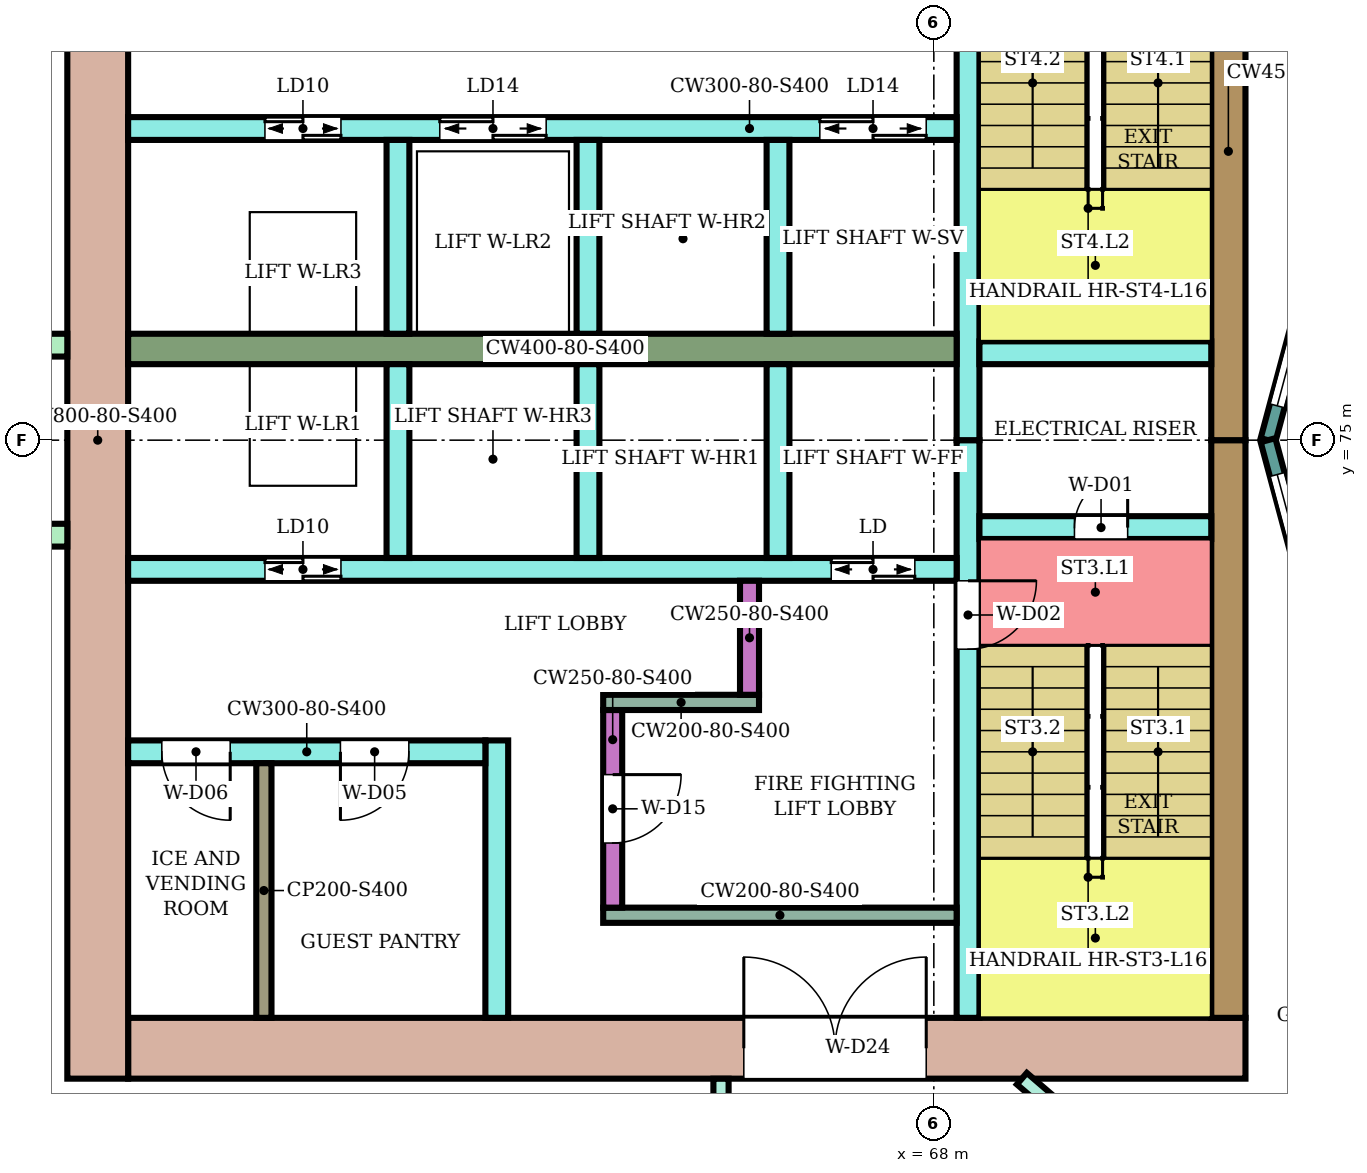
"""IFC4 building model, lengths in metres.
Left out: names, types, materials, properties, quantities, classifications, styles, units other than length and angle.
Written with IfcOpenShell. Run it as: python <this file> out.ifc"""

import sys

from ifc_helpers import new_model, si_unit, direction, frame, frame_2d, origin, place, context, subcontext, project, spatial, rectangle, extrude, element, fill, save


model = new_model("IFC4")
c1 = context("Model", 3, precision=1e-05, world=origin(), true_north=direction((0.0, 1.0)))
c2 = subcontext(c1, "Body", "Model", "MODEL_VIEW")
j1 = project(units=[si_unit("LENGTHUNIT", "METRE"), si_unit("PLANEANGLEUNIT", "RADIAN")], contexts=[c1])
p1 = place(None, origin())
s1 = spatial("IfcSite", under=j1, at=p1, CompositionType="ELEMENT")
p2 = place(p1, origin())
s2 = spatial("IfcBuilding", under=s1, at=p2, CompositionType="ELEMENT")
p3 = place(p2, frame((0.0, 0.0, 70.6)))
s3 = spatial("IfcBuildingStorey", under=s2, at=p3, CompositionType="ELEMENT", Elevation=70.6)
p4 = place(p3, frame((72.1, 67.0, 0.0), z_axis=(0.0, 0.0, 1.0), x_axis=(-1.0, 0.0, 0.0)))
e1 = element("IfcWall", 1, at=p4, inside=s3, PredefinedType="SHEAR", context=c2, shape_type="SweptSolid", body=[
    extrude(rectangle(XDim=14.7, YDim=0.8, at=frame_2d((7.35, 0.0))), origin(), (0.0, 0.0, 1.0), 3.4),
])
p5 = place(p4, frame((4.2, 0.0, 0.0)))
e2 = element("IfcOpeningElement", 2, at=p5, cuts=e1, PredefinedType="OPENING", context=c2, shape_type="SweptSolid", body=[
    extrude(rectangle(XDim=2.4, YDim=2.4, at=frame_2d((1.2, 1.2))), frame((0.0, 0.41, 0.0), z_axis=(0.0, -1.0, 0.0), x_axis=(1.0, 0.0, 0.0)), (0.0, 0.0, 1.0), 0.82),
])
for number, where, z_axis, x_axis in (
    (3, (71.875, 75.0, 0.0), (0.0, 0.0, 1.0), (0.0, -1.0, 0.0)),
    (4, (71.875, 82.6, 0.0), (0.0, 0.0, 1.0), (0.0, -1.0, 0.0)),
):
    element("IfcWall", number, at=place(p3, frame(where, z_axis=z_axis, x_axis=x_axis)), inside=s3, PredefinedType="SHEAR", context=c2, shape_type="SweptSolid", body=[
        extrude(rectangle(XDim=7.6, YDim=0.45, at=frame_2d((3.8, 0.0))), origin(), (0.0, 0.0, 1.0), 3.4),
    ])
p6 = place(p3, frame((57.0, 83.4, 0.0), z_axis=(0.0, 0.0, 1.0), x_axis=(0.0, -1.0, 0.0)))
e5 = element("IfcWall", 5, at=p6, inside=s3, PredefinedType="SHEAR", context=c2, shape_type="SweptSolid", body=[
    extrude(rectangle(XDim=16.8, YDim=0.8, at=frame_2d((8.4, 0.0))), origin(), (0.0, 0.0, 1.0), 3.4),
])
p7 = place(p3, frame((68.45, 75.0, 0.0), z_axis=(0.0, 0.0, 1.0), x_axis=(0.0, -1.0, 0.0)))
e6 = element("IfcWall", 6, at=p7, inside=s3, PredefinedType="SHEAR", context=c2, shape_type="SweptSolid", body=[
    extrude(rectangle(XDim=7.6, YDim=0.3, at=frame_2d((3.8, 0.0))), origin(), (0.0, 0.0, 1.0), 3.4),
])
p8 = place(p7, frame((1.85, 0.0, 0.0)))
e7 = element("IfcOpeningElement", 7, at=p8, cuts=e6, PredefinedType="OPENING", context=c2, shape_type="SweptSolid", body=[
    extrude(rectangle(XDim=0.9, YDim=2.1, at=frame_2d((0.45, 1.05))), frame((0.0, 0.16, 0.0), z_axis=(0.0, -1.0, 0.0), x_axis=(1.0, 0.0, 0.0)), (0.0, 0.0, 1.0), 0.32),
])
p9 = place(p3, frame((68.45, 82.6, 0.0), z_axis=(0.0, 0.0, 1.0), x_axis=(0.0, -1.0, 0.0)))
e8 = element("IfcWall", 8, at=p9, inside=s3, PredefinedType="SHEAR", context=c2, shape_type="SweptSolid", body=[
    extrude(rectangle(XDim=7.6, YDim=0.3, at=frame_2d((3.8, 0.0))), origin(), (0.0, 0.0, 1.0), 3.4),
])
p10 = place(p9, frame((0.25, 0.0, 0.0)))
e9 = element("IfcOpeningElement", 9, at=p10, cuts=e8, PredefinedType="OPENING", context=c2, shape_type="SweptSolid", body=[
    extrude(rectangle(XDim=0.9, YDim=2.1, at=frame_2d((0.45, 1.05))), frame((0.0, 0.16, 0.0), z_axis=(0.0, -1.0, 0.0), x_axis=(1.0, 0.0, 0.0)), (0.0, 0.0, 1.0), 0.32),
])
p11 = place(p3, frame((71.65, 73.85, 0.0), z_axis=(0.0, 0.0, 1.0), x_axis=(-1.0, 0.0, 0.0)))
e10 = element("IfcWall", 10, at=p11, inside=s3, PredefinedType="SHEAR", context=c2, shape_type="SweptSolid", body=[
    extrude(rectangle(XDim=3.05, YDim=0.3, at=frame_2d((1.525, 0.0))), origin(), (0.0, 0.0, 1.0), 3.4),
])
p12 = place(p11, frame((1.1, 0.0, 0.0)))
e11 = element("IfcOpeningElement", 11, at=p12, cuts=e10, PredefinedType="OPENING", context=c2, shape_type="SweptSolid", body=[
    extrude(rectangle(XDim=0.7, YDim=2.0, at=frame_2d((0.35, 1.0))), frame((0.0, 0.16, 0.0), z_axis=(0.0, -1.0, 0.0), x_axis=(1.0, 0.0, 0.0)), (0.0, 0.0, 1.0), 0.32),
])
p13 = place(p3, frame((71.65, 76.15, 0.0), z_axis=(0.0, 0.0, 1.0), x_axis=(-1.0, 0.0, 0.0)))
e12 = element("IfcWall", 12, at=p13, inside=s3, PredefinedType="SHEAR", context=c2, shape_type="SweptSolid", body=[
    extrude(rectangle(XDim=3.05, YDim=0.3, at=frame_2d((1.525, 0.0))), origin(), (0.0, 0.0, 1.0), 3.4),
])
p14 = place(p3, frame((68.3, 73.3, 0.0), z_axis=(0.0, 0.0, 1.0), x_axis=(-1.0, 0.0, 0.0)))
e13 = element("IfcWall", 13, at=p14, inside=s3, PredefinedType="SHEAR", context=c2, shape_type="SweptSolid", body=[
    extrude(rectangle(XDim=10.9, YDim=0.3, at=frame_2d((5.45, 0.0))), origin(), (0.0, 0.0, 1.0), 3.4),
])
p15 = place(p14, frame((0.55, 0.0, 0.0)))
e14 = element("IfcOpeningElement", 14, at=p15, cuts=e13, PredefinedType="OPENING", context=c2, shape_type="SweptSolid", body=[
    extrude(rectangle(XDim=1.1, YDim=2.1, at=frame_2d((0.55, 1.05))), frame((0.0, 0.16, 0.0), z_axis=(0.0, -1.0, 0.0), x_axis=(1.0, 0.0, 0.0)), (0.0, 0.0, 1.0), 0.32),
])
p16 = place(p14, frame((8.1, 0.0, 0.0)))
e15 = element("IfcOpeningElement", 15, at=p16, cuts=e13, PredefinedType="OPENING", context=c2, shape_type="SweptSolid", body=[
    extrude(rectangle(XDim=1.0, YDim=2.1, at=frame_2d((0.5, 1.05))), frame((0.0, 0.16, 0.0), z_axis=(0.0, -1.0, 0.0), x_axis=(1.0, 0.0, 0.0)), (0.0, 0.0, 1.0), 0.32),
])
p17 = place(p3, frame((68.3, 76.2, 0.0), z_axis=(0.0, 0.0, 1.0), x_axis=(-1.0, 0.0, 0.0)))
e16 = element("IfcWall", 16, at=p17, inside=s3, PredefinedType="SHEAR", context=c2, shape_type="SweptSolid", body=[
    extrude(rectangle(XDim=10.9, YDim=0.4, at=frame_2d((5.45, 0.0))), origin(), (0.0, 0.0, 1.0), 3.4),
])
p18 = place(p3, frame((68.3, 79.1, 0.0), z_axis=(0.0, 0.0, 1.0), x_axis=(-1.0, 0.0, 0.0)))
e17 = element("IfcWall", 17, at=p18, inside=s3, PredefinedType="SHEAR", context=c2, shape_type="SweptSolid", body=[
    extrude(rectangle(XDim=10.9, YDim=0.3, at=frame_2d((5.45, 0.0))), origin(), (0.0, 0.0, 1.0), 3.4),
])
p19 = place(p18, frame((0.4, 0.0, 0.0)))
e18 = element("IfcOpeningElement", 18, at=p19, cuts=e17, PredefinedType="OPENING", context=c2, shape_type="SweptSolid", body=[
    extrude(rectangle(XDim=1.4, YDim=2.1, at=frame_2d((0.7, 1.05))), frame((0.0, 0.16, 0.0), z_axis=(0.0, -1.0, 0.0), x_axis=(1.0, 0.0, 0.0)), (0.0, 0.0, 1.0), 0.32),
])
p20 = place(p18, frame((5.4, 0.0, 0.0)))
e19 = element("IfcOpeningElement", 19, at=p20, cuts=e17, PredefinedType="OPENING", context=c2, shape_type="SweptSolid", body=[
    extrude(rectangle(XDim=1.4, YDim=2.1, at=frame_2d((0.7, 1.05))), frame((0.0, 0.16, 0.0), z_axis=(0.0, -1.0, 0.0), x_axis=(1.0, 0.0, 0.0)), (0.0, 0.0, 1.0), 0.32),
])
p21 = place(p18, frame((8.1, 0.0, 0.0)))
e20 = element("IfcOpeningElement", 20, at=p21, cuts=e17, PredefinedType="OPENING", context=c2, shape_type="SweptSolid", body=[
    extrude(rectangle(XDim=1.0, YDim=2.1, at=frame_2d((0.5, 1.05))), frame((0.0, 0.16, 0.0), z_axis=(0.0, -1.0, 0.0), x_axis=(1.0, 0.0, 0.0)), (0.0, 0.0, 1.0), 0.32),
])
for number, where, z_axis, x_axis in (
    (21, (65.95, 76.0, 0.0), (0.0, 0.0, 1.0), (0.0, -1.0, 0.0)),
    (22, (63.45, 76.0, 0.0), (0.0, 0.0, 1.0), (0.0, -1.0, 0.0)),
    (23, (60.95, 76.0, 0.0), (0.0, 0.0, 1.0), (0.0, -1.0, 0.0)),
    (24, (65.95, 78.95, 0.0), (0.0, 0.0, 1.0), (0.0, -1.0, 0.0)),
    (25, (63.45, 78.95, 0.0), (0.0, 0.0, 1.0), (0.0, -1.0, 0.0)),
    (26, (60.95, 78.95, 0.0), (0.0, 0.0, 1.0), (0.0, -1.0, 0.0)),
):
    element("IfcWall", number, at=place(p3, frame(where, z_axis=z_axis, x_axis=x_axis)), inside=s3, PredefinedType="SHEAR", context=c2, shape_type="SweptSolid", body=[
        extrude(rectangle(XDim=2.55, YDim=0.3, at=frame_2d((1.275, 0.0))), origin(), (0.0, 0.0, 1.0), 3.4),
    ])
p22 = place(p3, frame((68.3, 68.75, 0.0), z_axis=(0.0, 0.0, 1.0), x_axis=(-1.0, 0.0, 0.0)))
e27 = element("IfcWall", 27, at=p22, inside=s3, PredefinedType="SHEAR", context=c2, shape_type="SweptSolid", body=[
    extrude(rectangle(XDim=4.65, YDim=0.2, at=frame_2d((2.325, 0.0))), origin(), (0.0, 0.0, 1.0), 3.4),
])
p23 = place(p3, frame((63.775, 71.45, 0.0), z_axis=(0.0, 0.0, 1.0), x_axis=(0.0, -1.0, 0.0)))
e28 = element("IfcWall", 28, at=p23, inside=s3, PredefinedType="SHEAR", context=c2, shape_type="SweptSolid", body=[
    extrude(rectangle(XDim=2.6, YDim=0.25, at=frame_2d((1.3, 0.0))), origin(), (0.0, 0.0, 1.0), 3.4),
])
p24 = place(p23, frame((0.85, 0.0, 0.0)))
e29 = element("IfcOpeningElement", 29, at=p24, cuts=e28, PredefinedType="OPENING", context=c2, shape_type="SweptSolid", body=[
    extrude(rectangle(XDim=0.9, YDim=2.1, at=frame_2d((0.45, 1.05))), frame((0.0, 0.135, 0.0), z_axis=(0.0, -1.0, 0.0), x_axis=(1.0, 0.0, 0.0)), (0.0, 0.0, 1.0), 0.27),
])
p25 = place(p3, frame((65.7, 71.55, 0.0), z_axis=(0.0, 0.0, 1.0), x_axis=(-1.0, 0.0, 0.0)))
e30 = element("IfcWall", 30, at=p25, inside=s3, PredefinedType="SHEAR", context=c2, shape_type="SweptSolid", body=[
    extrude(rectangle(XDim=2.05, YDim=0.2, at=frame_2d((1.025, 0.0))), origin(), (0.0, 0.0, 1.0), 3.4),
])
p26 = place(p3, frame((65.575, 73.15, 0.0), z_axis=(0.0, 0.0, 1.0), x_axis=(0.0, -1.0, 0.0)))
e31 = element("IfcWall", 31, at=p26, inside=s3, PredefinedType="SHEAR", context=c2, shape_type="SweptSolid", body=[
    extrude(rectangle(XDim=1.5, YDim=0.25, at=frame_2d((0.75, 0.0))), origin(), (0.0, 0.0, 1.0), 3.4),
])
p27 = place(p3, frame((62.25, 71.05, 0.0), z_axis=(0.0, 0.0, 1.0), x_axis=(0.0, -1.0, 0.0)))
e32 = element("IfcWall", 32, at=p27, inside=s3, PredefinedType="SHEAR", context=c2, shape_type="SweptSolid", body=[
    extrude(rectangle(XDim=3.65, YDim=0.3, at=frame_2d((1.825, 0.0))), origin(), (0.0, 0.0, 1.0), 3.4),
])
p28 = place(p3, frame((62.1, 70.9, 0.0), z_axis=(0.0, 0.0, 1.0), x_axis=(-1.0, 0.0, 0.0)))
e33 = element("IfcWall", 33, at=p28, inside=s3, PredefinedType="SHEAR", context=c2, shape_type="SweptSolid", body=[
    extrude(rectangle(XDim=4.7, YDim=0.3, at=frame_2d((2.35, 0.0))), origin(), (0.0, 0.0, 1.0), 3.4),
])
p29 = place(p28, frame((1.007, 0.0, 0.0)))
e34 = element("IfcOpeningElement", 34, at=p29, cuts=e33, PredefinedType="OPENING", context=c2, shape_type="SweptSolid", body=[
    extrude(rectangle(XDim=0.9, YDim=2.1, at=frame_2d((0.45, 1.05))), frame((0.0, 0.16, 0.0), z_axis=(0.0, -1.0, 0.0), x_axis=(1.0, 0.0, 0.0)), (0.0, 0.0, 1.0), 0.32),
])
p30 = place(p28, frame((3.357, 0.0, 0.0)))
e35 = element("IfcOpeningElement", 35, at=p30, cuts=e33, PredefinedType="OPENING", context=c2, shape_type="SweptSolid", body=[
    extrude(rectangle(XDim=0.9, YDim=2.1, at=frame_2d((0.45, 1.05))), frame((0.0, 0.16, 0.0), z_axis=(0.0, -1.0, 0.0), x_axis=(1.0, 0.0, 0.0)), (0.0, 0.0, 1.0), 0.32),
])
for number, where, z_axis, x_axis in (
    (36, (56.6, 76.25, 0.0), (0.0, 0.0, 1.0), (-1.0, 0.0, 0.0)),
    (37, (56.6, 73.75, 0.0), (0.0, 0.0, 1.0), (-1.0, 0.0, 0.0)),
):
    element("IfcWall", number, at=place(p3, frame(where, z_axis=z_axis, x_axis=x_axis)), inside=s3, PredefinedType="NOTDEFINED", context=c2, shape_type="SweptSolid", body=[
        extrude(rectangle(XDim=2.416, YDim=0.3, at=frame_2d((1.208, 0.0))), origin(), (0.0, 0.0, 1.0), 3.8),
    ])
p31 = place(p3, frame((73.415, 78.802, 0.0), z_axis=(0.0, 0.0, 1.0), x_axis=(-0.258789828301, -0.965933654434, 0.0)))
e38 = element("IfcWall", 38, at=p31, inside=s3, PredefinedType="NOTDEFINED", context=c2, shape_type="SweptSolid", body=[
    extrude(rectangle(XDim=3.936, YDim=0.2, at=frame_2d((1.968, 0.0))), origin(), (0.0, 0.0, 1.0), 3.8),
])
p32 = place(p31, frame((0.468, 0.0, 0.9)))
e39 = element("IfcOpeningElement", 39, at=p32, cuts=e38, PredefinedType="OPENING", context=c2, shape_type="SweptSolid", body=[
    extrude(rectangle(XDim=3.0, YDim=2.3, at=frame_2d((1.5, 1.15))), frame((0.0, 0.11, 0.0), z_axis=(0.0, -1.0, 0.0), x_axis=(1.0, 0.0, 0.0)), (0.0, 0.0, 1.0), 0.22),
])
p33 = place(p3, frame((72.396, 75.0, 0.0), z_axis=(0.0, 0.0, 1.0), x_axis=(0.258789828301, -0.965933654434, 0.0)))
e40 = element("IfcWall", 40, at=p33, inside=s3, PredefinedType="NOTDEFINED", context=c2, shape_type="SweptSolid", body=[
    extrude(rectangle(XDim=3.936, YDim=0.2, at=frame_2d((1.968, 0.0))), origin(), (0.0, 0.0, 1.0), 3.8),
])
p34 = place(p33, frame((0.468, 0.0, 0.9)))
e41 = element("IfcOpeningElement", 41, at=p34, cuts=e40, PredefinedType="OPENING", context=c2, shape_type="SweptSolid", body=[
    extrude(rectangle(XDim=3.0, YDim=2.3, at=frame_2d((1.5, 1.15))), frame((0.0, 0.11, 0.0), z_axis=(0.0, -1.0, 0.0), x_axis=(1.0, 0.0, 0.0)), (0.0, 0.0, 1.0), 0.22),
])
p35 = place(p3, frame((65.2, 65.2, 0.0), z_axis=(0.0, 0.0, 1.0), x_axis=(0.0, 1.0, 0.0)))
e42 = element("IfcWall", 42, at=p35, inside=s3, PredefinedType="PARTITIONING", context=c2, shape_type="SweptSolid", body=[
    extrude(rectangle(XDim=1.399, YDim=0.2, at=frame_2d((0.7, 0.0))), origin(), (0.0, 0.0, 1.0), 3.35),
])
p36 = place(p3, frame((69.158, 66.6, 0.0), z_axis=(0.0, 0.0, 1.0), x_axis=(0.757976058094, -0.652282373943, 0.0)))
e43 = element("IfcWall", 43, at=p36, inside=s3, PredefinedType="PARTITIONING", context=c2, shape_type="SweptSolid", body=[
    extrude(rectangle(XDim=5.16, YDim=0.2, at=frame_2d((2.58, 0.0))), origin(), (0.0, 0.0, 1.0), 3.35),
])
p37 = place(p36, frame((1.6, 0.0, 0.0)))
e44 = element("IfcOpeningElement", 44, at=p37, cuts=e43, PredefinedType="OPENING", context=c2, shape_type="SweptSolid", body=[
    extrude(rectangle(XDim=1.0, YDim=2.1, at=frame_2d((0.5, 1.05))), frame((0.0, 0.11, 0.0), z_axis=(0.0, -1.0, 0.0), x_axis=(1.0, 0.0, 0.0)), (0.0, 0.0, 1.0), 0.22),
])
p38 = place(p3, frame((71.596, 64.635, 0.0), z_axis=(0.0, 0.0, 1.0), x_axis=(0.652285007511, 0.757973791748, 0.0)))
e45 = element("IfcWall", 45, at=p38, inside=s3, PredefinedType="PARTITIONING", context=c2, shape_type="SweptSolid", body=[
    extrude(rectangle(XDim=2.65, YDim=0.1, at=frame_2d((1.325, 0.0))), origin(), (0.0, 0.0, 1.0), 3.35),
])
p39 = place(p38, frame((0.6, 0.0, 0.0)))
e46 = element("IfcOpeningElement", 46, at=p39, cuts=e45, PredefinedType="OPENING", context=c2, shape_type="SweptSolid", body=[
    extrude(rectangle(XDim=0.8, YDim=2.1, at=frame_2d((0.4, 1.05))), frame((0.0, 0.06, 0.0), z_axis=(0.0, -1.0, 0.0), x_axis=(1.0, 0.0, 0.0)), (0.0, 0.0, 1.0), 0.12),
])
p40 = place(p3, frame((59.186, 70.75, 0.0), z_axis=(0.0, 0.0, 1.0), x_axis=(0.0, -1.0, 0.0)))
e47 = element("IfcWall", 47, at=p40, inside=s3, PredefinedType="PARTITIONING", context=c2, shape_type="SweptSolid", body=[
    extrude(rectangle(XDim=3.35, YDim=0.2, at=frame_2d((1.675, 0.0))), origin(), (0.0, 0.0, 1.0), 3.4),
])
p41 = place(p32, origin())
e48 = element("IfcWindow", 48, at=p41, inside=s3, PartitioningType="SINGLE_PANEL", PredefinedType="WINDOW", context=c2, shape_type="SweptSolid", body=[
    extrude(rectangle(XDim=3.0, YDim=2.3, at=frame_2d((1.5, 1.15))), frame((0.0, 0.03, 0.0), z_axis=(0.0, -1.0, 0.0), x_axis=(1.0, 0.0, 0.0)), (0.0, 0.0, 1.0), 0.06),
])
fill(e39, e48)
p42 = place(p34, origin())
e49 = element("IfcWindow", 49, at=p42, inside=s3, PartitioningType="SINGLE_PANEL", PredefinedType="WINDOW", context=c2, shape_type="SweptSolid", body=[
    extrude(rectangle(XDim=3.0, YDim=2.3, at=frame_2d((1.5, 1.15))), frame((0.0, 0.03, 0.0), z_axis=(0.0, -1.0, 0.0), x_axis=(1.0, 0.0, 0.0)), (0.0, 0.0, 1.0), 0.06),
])
fill(e41, e49)
p43 = place(p12, frame((0.7, 0.0, 0.0), z_axis=(0.0, 0.0, 1.0), x_axis=(-1.0, 0.0, 0.0)))
e50 = element("IfcDoor", 50, at=p43, inside=s3, OperationType="SINGLE_SWING_RIGHT", PredefinedType="DOOR", context=c2, shape_type="SweptSolid", body=[
    extrude(rectangle(XDim=0.7, YDim=2.0, at=frame_2d((0.35, 1.0))), frame((0.0, 0.025, 0.0), z_axis=(0.0, -1.0, 0.0), x_axis=(1.0, 0.0, 0.0)), (0.0, 0.0, 1.0), 0.05),
])
fill(e11, e50)
p44 = place(p8, origin())
e51 = element("IfcDoor", 51, at=p44, inside=s3, OperationType="SINGLE_SWING_LEFT", PredefinedType="DOOR", context=c2, shape_type="SweptSolid", body=[
    extrude(rectangle(XDim=0.9, YDim=2.1, at=frame_2d((0.45, 1.05))), frame((0.0, 0.025, 0.0), z_axis=(0.0, -1.0, 0.0), x_axis=(1.0, 0.0, 0.0)), (0.0, 0.0, 1.0), 0.05),
])
fill(e7, e51)
p45 = place(p15, origin())
e52 = element("IfcDoor", 52, at=p45, inside=s3, OperationType="DOUBLE_DOOR_SLIDING", PredefinedType="DOOR", context=c2, shape_type="SweptSolid", body=[
    extrude(rectangle(XDim=1.1, YDim=2.1, at=frame_2d((0.55, 1.05))), frame((0.0, 0.025, 0.0), z_axis=(0.0, -1.0, 0.0), x_axis=(1.0, 0.0, 0.0)), (0.0, 0.0, 1.0), 0.05),
])
fill(e14, e52)
p46 = place(p16, origin())
e53 = element("IfcDoor", 53, at=p46, inside=s3, OperationType="DOUBLE_DOOR_SLIDING", PredefinedType="DOOR", context=c2, shape_type="SweptSolid", body=[
    extrude(rectangle(XDim=1.0, YDim=2.1, at=frame_2d((0.5, 1.05))), frame((0.0, 0.025, 0.0), z_axis=(0.0, -1.0, 0.0), x_axis=(1.0, 0.0, 0.0)), (0.0, 0.0, 1.0), 0.05),
])
fill(e15, e53)
p47 = place(p19, origin())
e54 = element("IfcDoor", 54, at=p47, inside=s3, OperationType="DOUBLE_DOOR_SLIDING", PredefinedType="DOOR", context=c2, shape_type="SweptSolid", body=[
    extrude(rectangle(XDim=1.4, YDim=2.1, at=frame_2d((0.7, 1.05))), frame((0.0, 0.025, 0.0), z_axis=(0.0, -1.0, 0.0), x_axis=(1.0, 0.0, 0.0)), (0.0, 0.0, 1.0), 0.05),
])
fill(e18, e54)
p48 = place(p20, origin())
e55 = element("IfcDoor", 55, at=p48, inside=s3, OperationType="DOUBLE_DOOR_SLIDING", PredefinedType="DOOR", context=c2, shape_type="SweptSolid", body=[
    extrude(rectangle(XDim=1.4, YDim=2.1, at=frame_2d((0.7, 1.05))), frame((0.0, 0.025, 0.0), z_axis=(0.0, -1.0, 0.0), x_axis=(1.0, 0.0, 0.0)), (0.0, 0.0, 1.0), 0.05),
])
fill(e19, e55)
p49 = place(p21, origin())
e56 = element("IfcDoor", 56, at=p49, inside=s3, OperationType="DOUBLE_DOOR_SLIDING", PredefinedType="DOOR", context=c2, shape_type="SweptSolid", body=[
    extrude(rectangle(XDim=1.0, YDim=2.1, at=frame_2d((0.5, 1.05))), frame((0.0, 0.025, 0.0), z_axis=(0.0, -1.0, 0.0), x_axis=(1.0, 0.0, 0.0)), (0.0, 0.0, 1.0), 0.05),
])
fill(e20, e56)
p50 = place(p24, origin())
e57 = element("IfcDoor", 57, at=p50, inside=s3, OperationType="SINGLE_SWING_LEFT", PredefinedType="DOOR", context=c2, shape_type="SweptSolid", body=[
    extrude(rectangle(XDim=0.9, YDim=2.1, at=frame_2d((0.45, 1.05))), frame((0.0, 0.025, 0.0), z_axis=(0.0, -1.0, 0.0), x_axis=(1.0, 0.0, 0.0)), (0.0, 0.0, 1.0), 0.05),
])
fill(e29, e57)
p51 = place(p29, origin())
e58 = element("IfcDoor", 58, at=p51, inside=s3, OperationType="SINGLE_SWING_RIGHT", PredefinedType="DOOR", context=c2, shape_type="SweptSolid", body=[
    extrude(rectangle(XDim=0.9, YDim=2.1, at=frame_2d((0.45, 1.05))), frame((0.0, 0.025, 0.0), z_axis=(0.0, -1.0, 0.0), x_axis=(1.0, 0.0, 0.0)), (0.0, 0.0, 1.0), 0.05),
])
fill(e34, e58)
p52 = place(p30, origin())
e59 = element("IfcDoor", 59, at=p52, inside=s3, OperationType="SINGLE_SWING_LEFT", PredefinedType="DOOR", context=c2, shape_type="SweptSolid", body=[
    extrude(rectangle(XDim=0.9, YDim=2.1, at=frame_2d((0.45, 1.05))), frame((0.0, 0.025, 0.0), z_axis=(0.0, -1.0, 0.0), x_axis=(1.0, 0.0, 0.0)), (0.0, 0.0, 1.0), 0.05),
])
fill(e35, e59)
p53 = place(p5, frame((2.4, 0.0, 0.0), z_axis=(0.0, 0.0, 1.0), x_axis=(-1.0, 0.0, 0.0)))
e60 = element("IfcDoor", 60, at=p53, inside=s3, OperationType="DOUBLE_DOOR_SINGLE_SWING", PredefinedType="DOOR", context=c2, shape_type="SweptSolid", body=[
    extrude(rectangle(XDim=2.4, YDim=2.4, at=frame_2d((1.2, 1.2))), frame((0.0, 0.025, 0.0), z_axis=(0.0, -1.0, 0.0), x_axis=(1.0, 0.0, 0.0)), (0.0, 0.0, 1.0), 0.05),
])
fill(e2, e60)
save(model, sys.argv[1])
